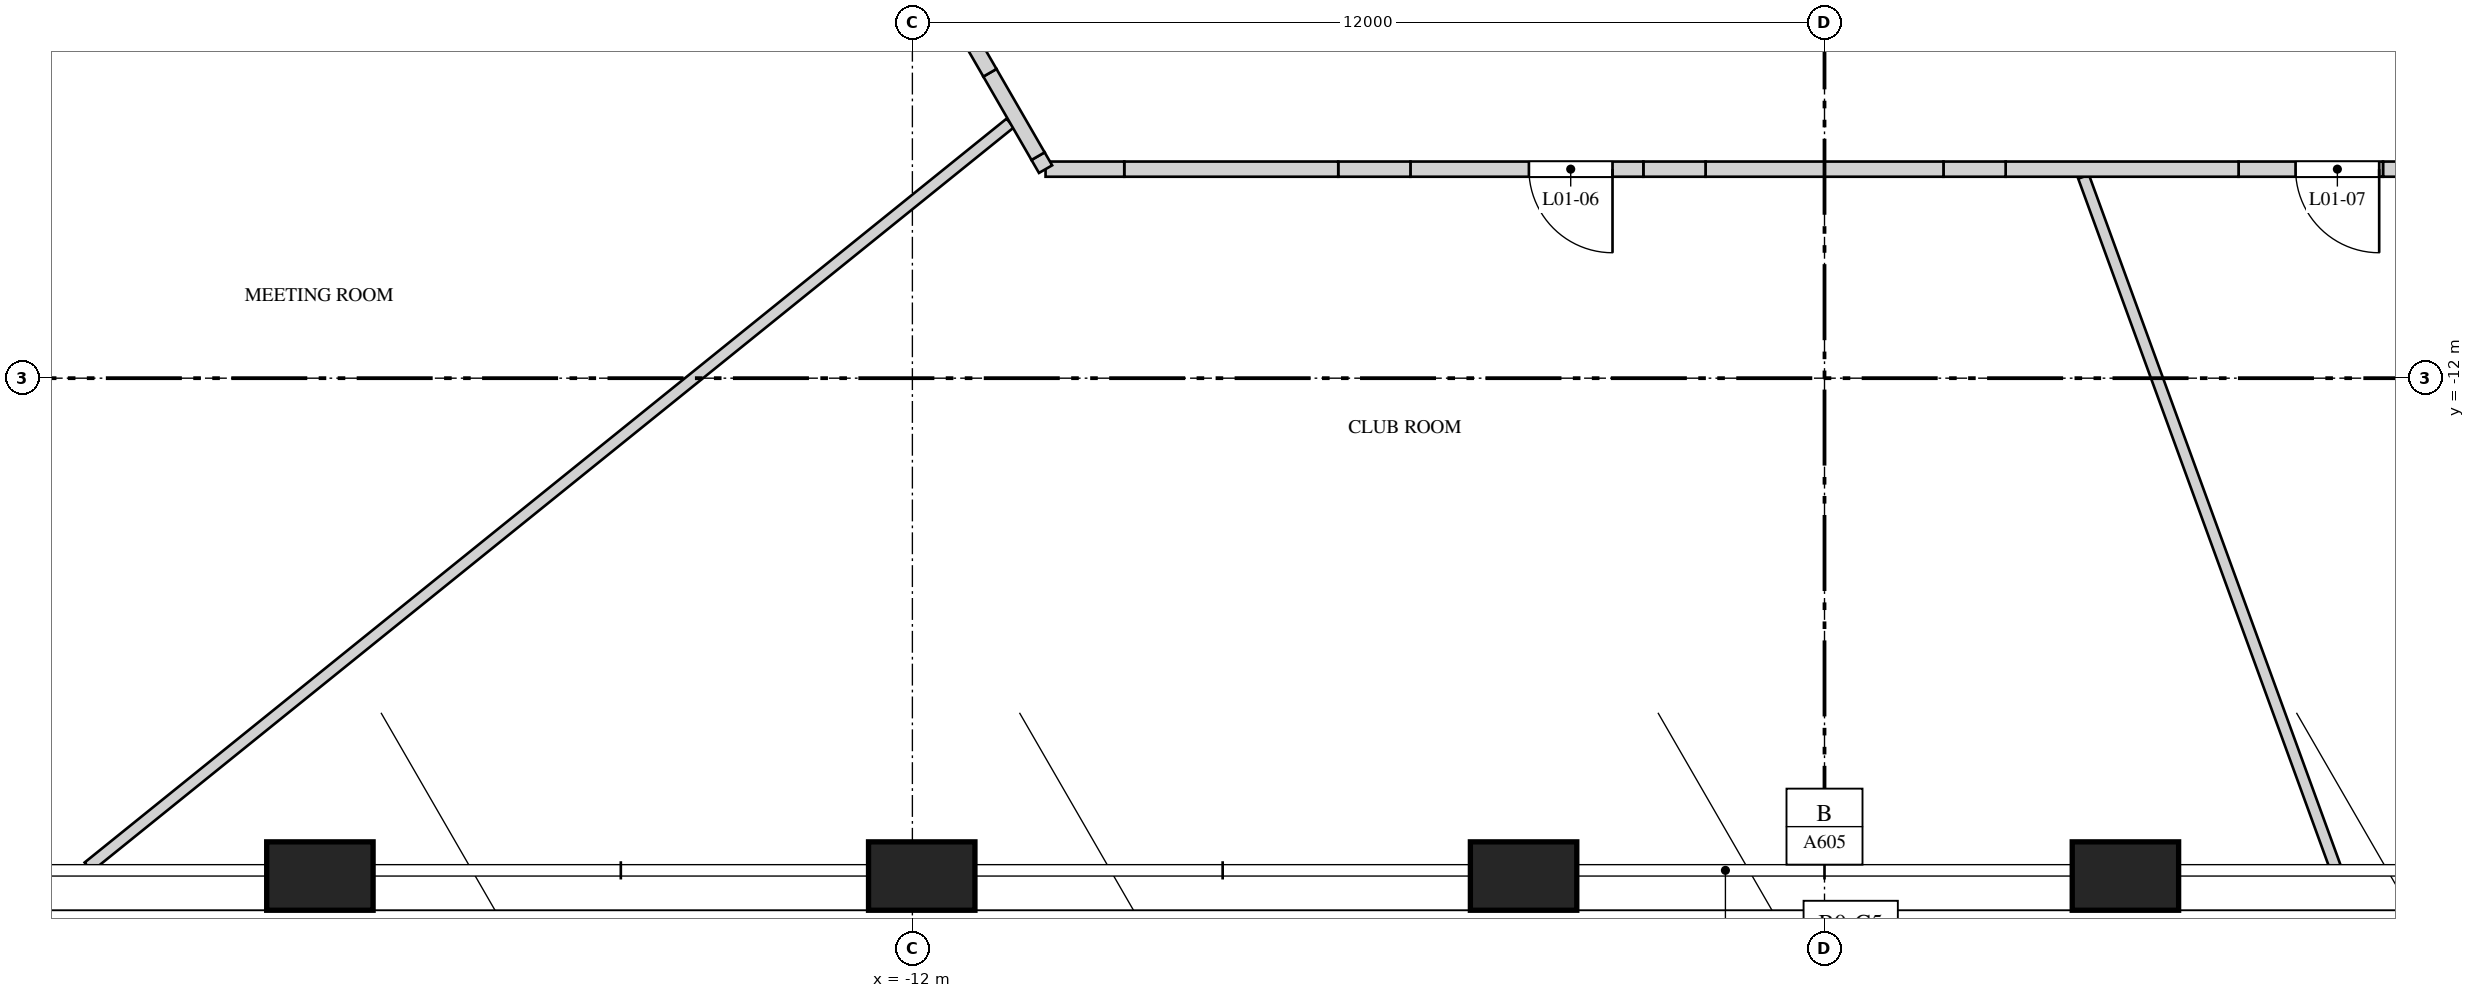
"""IFC4 building model, lengths in metres.
Left out: names, types, materials, properties, quantities, classifications, styles, units other than length and angle.
Written with IfcOpenShell. Run it as: python <this file> out.ifc"""

import sys

from ifc_helpers import new_model, si_unit, direction, frame, frame_2d, origin, origin_2d, place, context, subcontext, project, spatial, polyline, rectangle, outline, extrude, element, fill, save


model = new_model("IFC4")
c1 = context("Model", 3, precision=1e-05, world=origin(), true_north=direction((0.0, 1.0)))
c2 = subcontext(c1, "Body", "Model", "MODEL_VIEW")
j1 = project(units=[si_unit("LENGTHUNIT", "METRE"), si_unit("PLANEANGLEUNIT", "RADIAN")], contexts=[c1])
p1 = place(None, origin())
s1 = spatial("IfcSite", under=j1, at=p1, CompositionType="ELEMENT")
p2 = place(p1, origin())
s2 = spatial("IfcBuilding", under=s1, at=p2, CompositionType="ELEMENT")
p3 = place(p2, frame((0.0, 0.0, 10.0)))
s3 = spatial("IfcBuildingStorey", under=s2, at=p3, CompositionType="ELEMENT", Elevation=10.0)
for number, where, z_axis, x_axis in (
    (1, (-19.795, -18.55, 0.0), (0.0, 0.0, 1.0), (1.0, 0.0, 0.0)),
    (2, (-11.877, -18.55, 0.0), (0.0, 0.0, 1.0), (1.0, 0.0, 0.0)),
    (3, (-3.959, -18.55, 0.0), (0.0, 0.0, 1.0), (1.0, 0.0, 0.0)),
    (4, (3.959, -18.55, 0.0), (0.0, 0.0, 1.0), (1.0, 0.0, 0.0)),
):
    element("IfcColumn", number, at=place(p3, frame(where, z_axis=z_axis, x_axis=x_axis)), inside=s3, PredefinedType="COLUMN", context=c2, shape_type="SweptSolid", body=[
        extrude(rectangle(XDim=1.4, YDim=0.9, at=origin_2d()), origin(), (0.0, 0.0, 1.0), 5.0),
    ])
p4 = place(p3, frame((-13.21, -4.181, 0.0), z_axis=(0.0, 0.0, 1.0), x_axis=(-0.953395736476, -0.301722670128, 0.0)))
e5 = element("IfcWall", 5, at=p4, inside=s3, PredefinedType="PARTITIONING", context=c2, shape_type="SweptSolid", body=[
    extrude(rectangle(XDim=13.456, YDim=0.15, at=frame_2d((6.728, 0.0))), origin(), (0.0, 0.0, 1.0), 3.55),
])
p5 = place(p3, frame((-10.714, -8.644, 0.0), z_axis=(0.0, 0.0, 1.0), x_axis=(-0.77828239895, -0.627914410955, 0.0)))
e6 = element("IfcWall", 6, at=p5, inside=s3, PredefinedType="PARTITIONING", context=c2, shape_type="SweptSolid", body=[
    extrude(rectangle(XDim=15.585, YDim=0.15, at=frame_2d((7.792, 0.0))), origin(), (0.0, 0.0, 1.0), 4.65),
])
p6 = place(p3, frame((3.408, -9.35, 0.0), z_axis=(0.0, 0.0, 1.0), x_axis=(0.342501547894, -0.939517264179, 0.0)))
e7 = element("IfcWall", 7, at=p6, inside=s3, PredefinedType="PARTITIONING", context=c2, shape_type="SweptSolid", body=[
    extrude(rectangle(XDim=9.664, YDim=0.15, at=frame_2d((4.832, 0.0))), origin(), (0.0, 0.0, 1.0), 4.65),
])
p7 = place(p3, frame((9.213, -9.25, 0.0), z_axis=(0.0, 0.0, 1.0), x_axis=(-1.0, 0.0, 0.0)))
e8 = element("IfcWall", 8, at=p7, inside=s3, PredefinedType="SOLIDWALL", context=c2, shape_type="SweptSolid", body=[
    extrude(rectangle(XDim=1.865, YDim=0.2, at=frame_2d((0.933, 0.0))), origin(), (0.0, 0.0, 1.0), 4.65),
])
p8 = place(p3, frame((7.347, -9.25, 0.0), z_axis=(0.0, 0.0, 1.0), x_axis=(-1.0, 0.0, 0.0)))
e9 = element("IfcWall", 9, at=p8, inside=s3, PredefinedType="SOLIDWALL", context=c2, shape_type="SweptSolid", body=[
    extrude(outline(polyline([(0.0, 0.0), (1.9, 0.0), (1.9, 3.75), (0.95, 3.75), (0.95, 4.65), (0.0, 4.65), (0.0, 0.0)])), frame((0.0, 0.1, 0.0), z_axis=(0.0, -1.0, 0.0), x_axis=(1.0, 0.0, 0.0)), (0.0, 0.0, 1.0), 0.2),
])
p9 = place(p8, frame((0.05, 0.0, 0.0)))
e10 = element("IfcOpeningElement", 10, at=p9, cuts=e9, PredefinedType="OPENING", context=c2, shape_type="SweptSolid", body=[
    extrude(rectangle(XDim=1.1, YDim=2.4, at=frame_2d((0.55, 1.2))), frame((0.0, 0.11, 0.0), z_axis=(0.0, -1.0, 0.0), x_axis=(1.0, 0.0, 0.0)), (0.0, 0.0, 1.0), 0.22),
])
p10 = place(p3, frame((5.448, -9.25, 0.0), z_axis=(0.0, 0.0, 1.0), x_axis=(-1.0, 0.0, 0.0)))
e11 = element("IfcWall", 11, at=p10, inside=s3, PredefinedType="SOLIDWALL", context=c2, shape_type="SweptSolid", body=[
    extrude(rectangle(XDim=3.064, YDim=0.2, at=frame_2d((1.532, 0.0))), origin(), (0.0, 0.0, 1.0), 4.65),
])
p11 = place(p3, frame((2.383, -9.25, 0.0), z_axis=(0.0, 0.0, 1.0), x_axis=(-1.0, 0.0, 0.0)))
e12 = element("IfcWall", 12, at=p11, inside=s3, PredefinedType="SOLIDWALL", context=c2, shape_type="SweptSolid", body=[
    extrude(rectangle(XDim=0.818, YDim=0.2, at=frame_2d((0.409, 0.0))), origin(), (0.0, 0.0, 1.0), 3.75),
])
p12 = place(p3, frame((1.565, -9.25, 0.0), z_axis=(0.0, 0.0, 1.0), x_axis=(-1.0, 0.0, 0.0)))
e13 = element("IfcWall", 13, at=p12, inside=s3, PredefinedType="SOLIDWALL", context=c2, shape_type="SweptSolid", body=[
    extrude(rectangle(XDim=3.13, YDim=0.2, at=frame_2d((1.565, 0.0))), origin(), (0.0, 0.0, 1.0), 4.65),
])
p13 = place(p3, frame((-1.565, -9.25, 0.0), z_axis=(0.0, 0.0, 1.0), x_axis=(-1.0, 0.0, 0.0)))
e14 = element("IfcWall", 14, at=p13, inside=s3, PredefinedType="SOLIDWALL", context=c2, shape_type="SweptSolid", body=[
    extrude(rectangle(XDim=0.818, YDim=0.2, at=frame_2d((0.409, 0.0))), origin(), (0.0, 0.0, 1.0), 3.75),
])
p14 = place(p3, frame((-2.383, -9.25, 0.0), z_axis=(0.0, 0.0, 1.0), x_axis=(-1.0, 0.0, 0.0)))
e15 = element("IfcWall", 15, at=p14, inside=s3, PredefinedType="SOLIDWALL", context=c2, shape_type="SweptSolid", body=[
    extrude(rectangle(XDim=3.064, YDim=0.2, at=frame_2d((1.532, 0.0))), origin(), (0.0, 0.0, 1.0), 4.65),
])
p15 = place(p14, frame((0.406, 0.0, 0.0)))
e16 = element("IfcOpeningElement", 16, at=p15, cuts=e15, PredefinedType="OPENING", context=c2, shape_type="SweptSolid", body=[
    extrude(rectangle(XDim=1.1, YDim=2.4, at=frame_2d((0.55, 1.2))), frame((0.0, 0.11, 0.0), z_axis=(0.0, -1.0, 0.0), x_axis=(1.0, 0.0, 0.0)), (0.0, 0.0, 1.0), 0.22),
])
p16 = place(p3, frame((-5.448, -9.25, 0.0), z_axis=(0.0, 0.0, 1.0), x_axis=(-1.0, 0.0, 0.0)))
e17 = element("IfcWall", 17, at=p16, inside=s3, PredefinedType="SOLIDWALL", context=c2, shape_type="SweptSolid", body=[
    extrude(rectangle(XDim=0.95, YDim=0.2, at=frame_2d((0.475, 0.0))), origin(), (0.0, 0.0, 1.0), 3.75),
])
p17 = place(p3, frame((-6.397, -9.25, 0.0), z_axis=(0.0, 0.0, 1.0), x_axis=(-1.0, 0.0, 0.0)))
e18 = element("IfcWall", 18, at=p17, inside=s3, PredefinedType="SOLIDWALL", context=c2, shape_type="SweptSolid", body=[
    extrude(rectangle(XDim=2.815, YDim=0.2, at=frame_2d((1.408, 0.0))), origin(), (0.0, 0.0, 1.0), 4.65),
])
p18 = place(p3, frame((-9.213, -9.25, 0.0), z_axis=(0.0, 0.0, 1.0), x_axis=(-1.0, 0.0, 0.0)))
e19 = element("IfcWall", 19, at=p18, inside=s3, PredefinedType="SOLIDWALL", context=c2, shape_type="SweptSolid", body=[
    extrude(rectangle(XDim=1.035, YDim=0.2, at=frame_2d((0.518, 0.0))), origin(), (0.0, 0.0, 1.0), 3.55),
])
p19 = place(p3, frame((-10.248, -9.25, 0.0), z_axis=(0.0, 0.0, 1.0), x_axis=(-0.499865263774, 0.866103179807, 0.0)))
e20 = element("IfcWall", 20, at=p19, inside=s3, PredefinedType="SOLIDWALL", context=c2, shape_type="SweptSolid", body=[
    extrude(rectangle(XDim=0.197, YDim=0.2, at=frame_2d((0.099, 0.0))), origin(), (0.0, 0.0, 1.0), 3.55),
])
p20 = place(p3, frame((-10.347, -9.079, 0.0), z_axis=(0.0, 0.0, 1.0), x_axis=(-0.499911523785, 0.866076479525, 0.0)))
e21 = element("IfcWall", 21, at=p20, inside=s3, PredefinedType="SOLIDWALL", context=c2, shape_type="SweptSolid", body=[
    extrude(rectangle(XDim=1.267, YDim=0.2, at=frame_2d((0.633, 0.0))), origin(), (0.0, 0.0, 1.0), 4.65),
])
p21 = place(p3, frame((-10.98, -7.982, 0.0), z_axis=(0.0, 0.0, 1.0), x_axis=(-0.500097243556, 0.865969252911, 0.0)))
e22 = element("IfcWall", 22, at=p21, inside=s3, PredefinedType="SOLIDWALL", context=c2, shape_type="SweptSolid", body=[
    extrude(rectangle(XDim=0.902, YDim=0.2, at=frame_2d((0.451, 0.0))), origin(), (0.0, 0.0, 1.0), 3.55),
])
p22 = place(p15, origin())
e23 = element("IfcDoor", 23, at=p22, inside=s3, OperationType="SINGLE_SWING_RIGHT", PredefinedType="DOOR", context=c2, shape_type="SweptSolid", body=[
    extrude(rectangle(XDim=1.1, YDim=2.4, at=frame_2d((0.55, 1.2))), frame((0.0, 0.025, 0.0), z_axis=(0.0, -1.0, 0.0), x_axis=(1.0, 0.0, 0.0)), (0.0, 0.0, 1.0), 0.05),
])
fill(e16, e23)
p23 = place(p9, origin())
e24 = element("IfcDoor", 24, at=p23, inside=s3, OperationType="SINGLE_SWING_LEFT", PredefinedType="DOOR", context=c2, shape_type="SweptSolid", body=[
    extrude(rectangle(XDim=1.1, YDim=2.4, at=frame_2d((0.55, 1.2))), frame((0.0, 0.025, 0.0), z_axis=(0.0, -1.0, 0.0), x_axis=(1.0, 0.0, 0.0)), (0.0, 0.0, 1.0), 0.05),
])
fill(e10, e24)
save(model, sys.argv[1])
